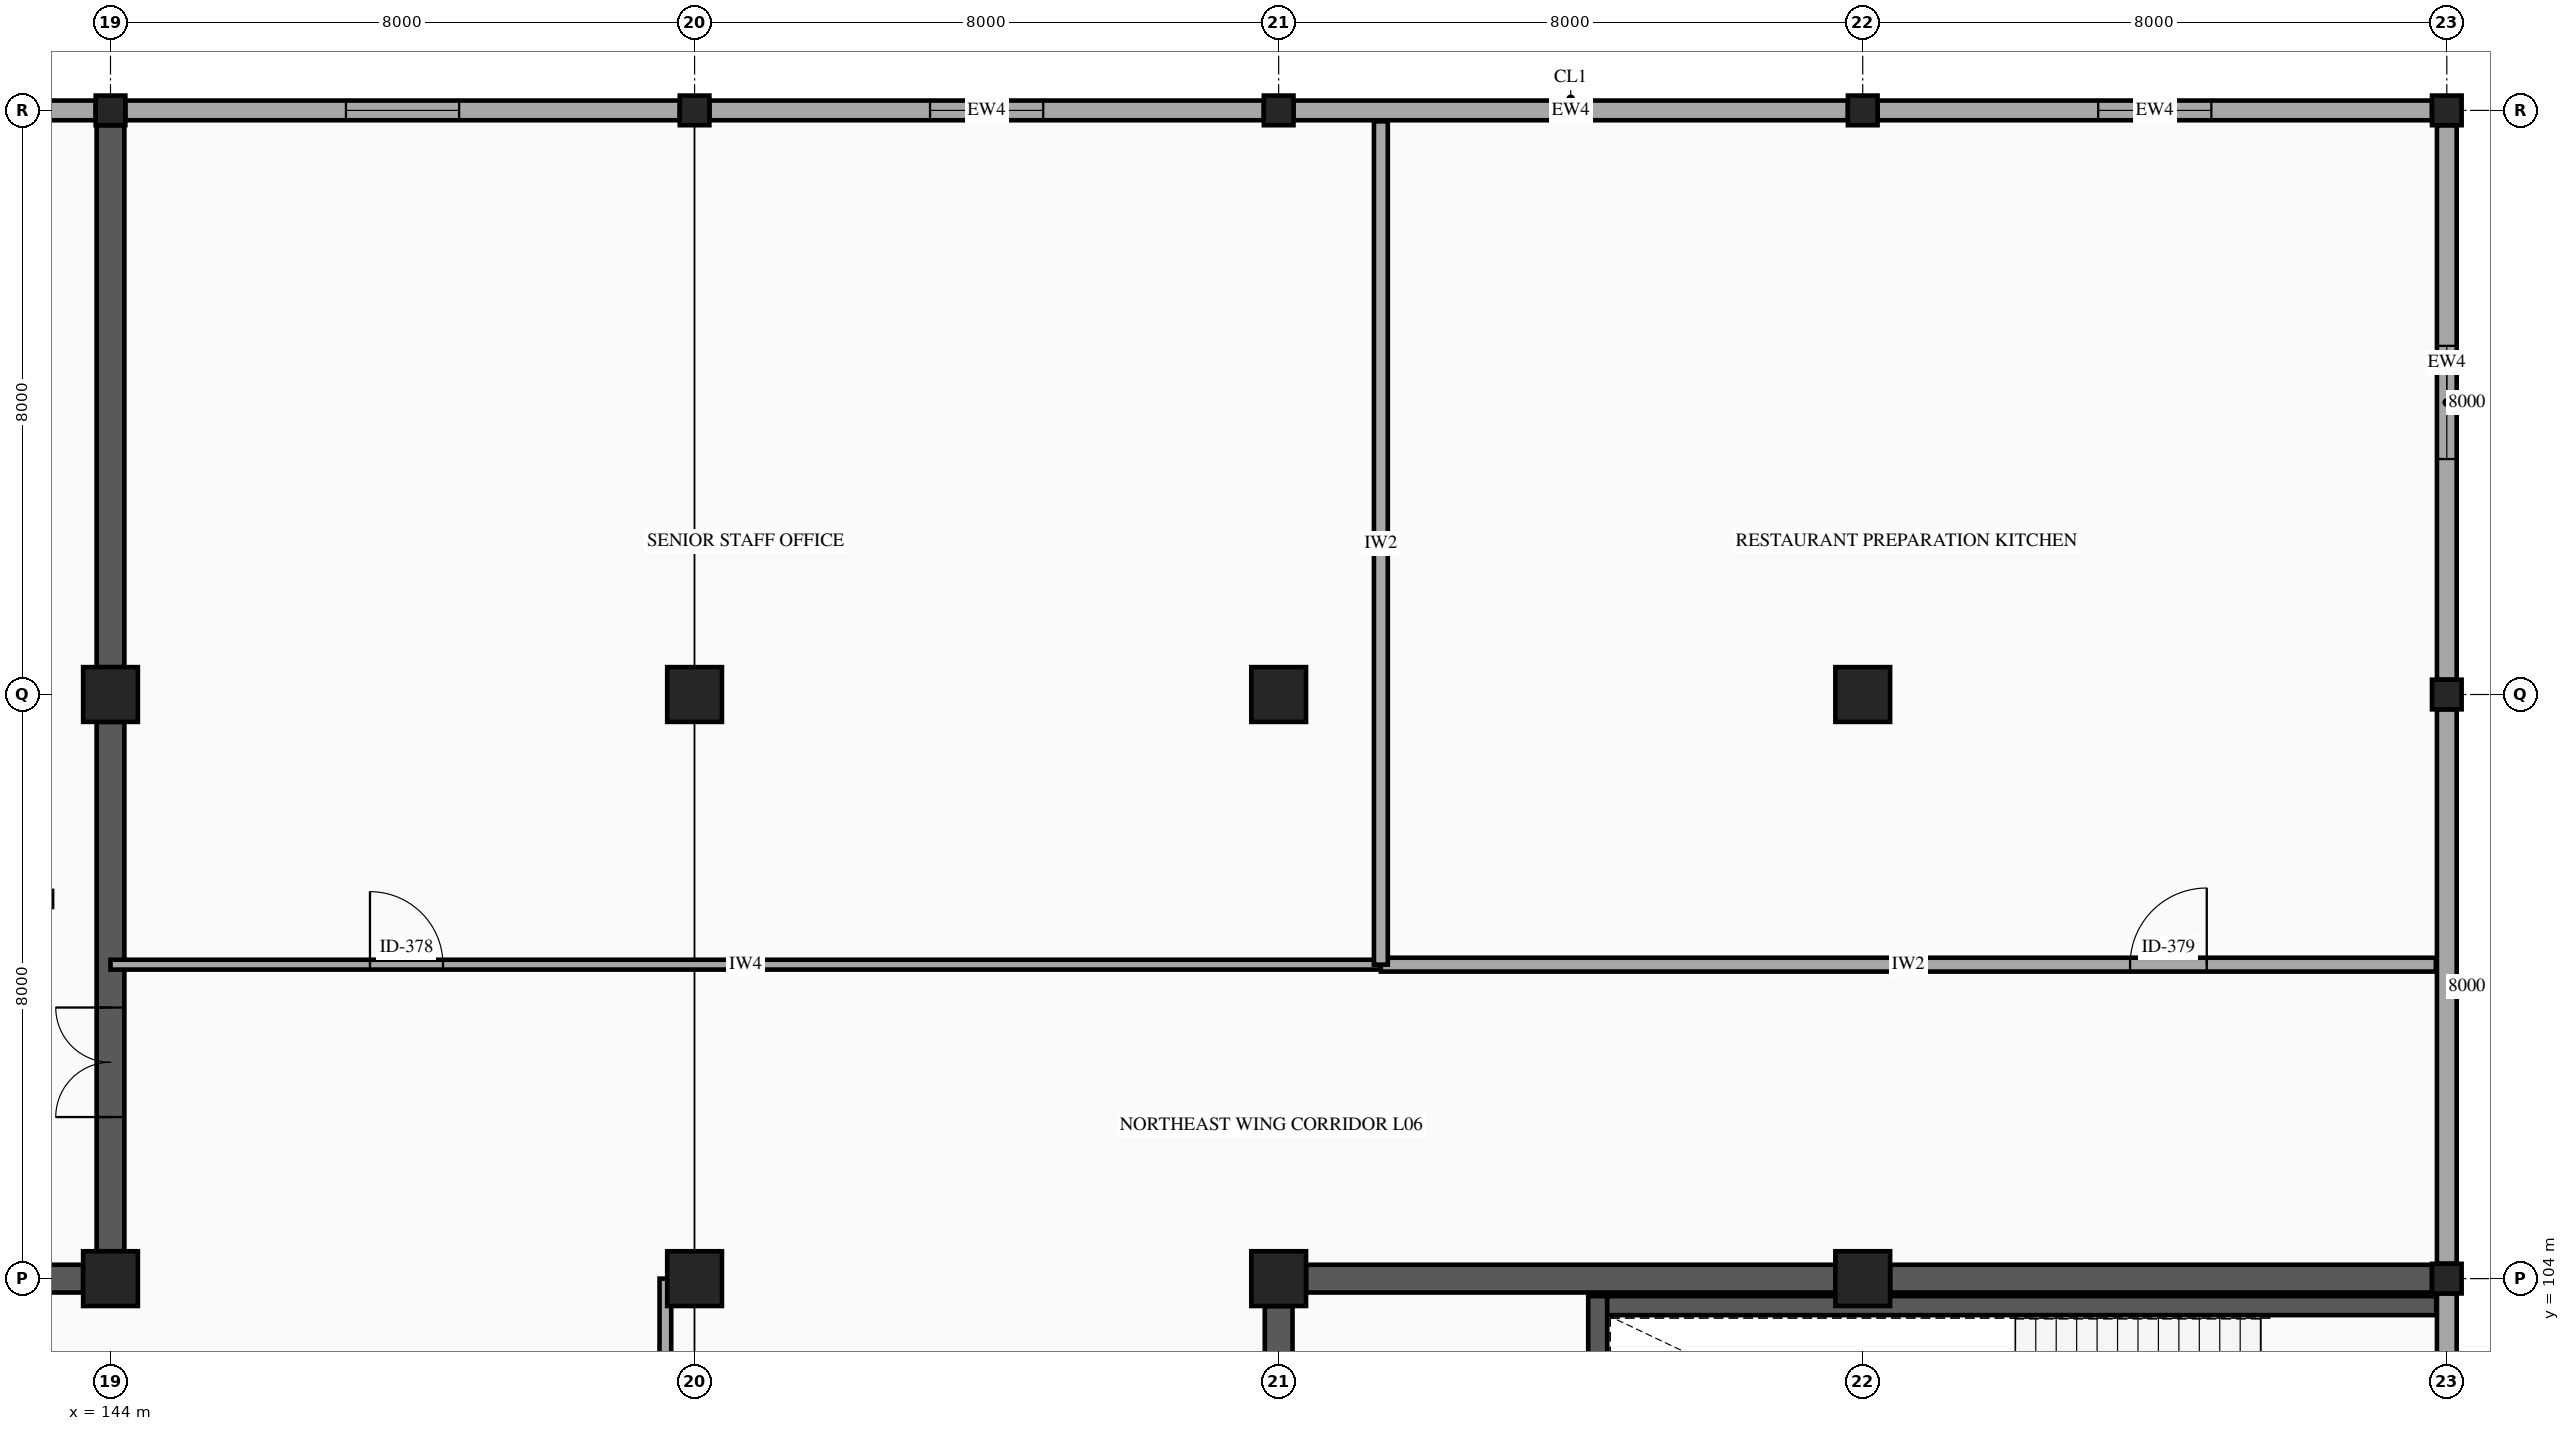
"""IFC4 building model, lengths in metres.
Left out: names, types, materials, properties, quantities, classifications, styles, units other than length and angle.
Written with IfcOpenShell. Run it as: python <this file> out.ifc"""

import sys

from ifc_helpers import new_model, si_unit, direction, frame, frame_2d, origin, origin_2d, place, context, subcontext, project, spatial, rectangle, hollow_rectangle, extrude, element, fill, save


model = new_model("IFC4")
c1 = context("Model", 3, precision=1e-05, world=origin(), true_north=direction((0.0, 1.0)))
c2 = subcontext(c1, "Body", "Model", "MODEL_VIEW")
j1 = project(units=[si_unit("LENGTHUNIT", "METRE"), si_unit("PLANEANGLEUNIT", "RADIAN")], contexts=[c1])
p1 = place(None, origin())
s1 = spatial("IfcSite", under=j1, at=p1, CompositionType="ELEMENT")
p2 = place(p1, origin())
s2 = spatial("IfcBuilding", under=s1, at=p2, CompositionType="ELEMENT")
p3 = place(p2, frame((0.0, 0.0, 28.4)))
s3 = spatial("IfcBuildingStorey", under=s2, at=p3, CompositionType="ELEMENT", Elevation=28.4)
for number, where, z_axis, x_axis in (
    (1, (144.0, 104.0, 0.0), (0.0, 0.0, 1.0), (1.0, 0.0, 0.0)),
    (2, (144.0, 112.0, 0.0), (0.0, 0.0, 1.0), (1.0, 0.0, 0.0)),
):
    element("IfcColumn", number, at=place(p3, frame(where, z_axis=z_axis, x_axis=x_axis)), inside=s3, PredefinedType="COLUMN", context=c2, shape_type="SweptSolid", body=[
        extrude(rectangle(XDim=0.75, YDim=0.75, at=origin_2d()), origin(), (0.0, 0.0, 1.0), 4.5),
    ])
p4 = place(p3, frame((144.0, 120.0, 0.0), z_axis=(0.0, 0.0, 1.0), x_axis=(1.0, 0.0, 0.0)))
e3 = element("IfcColumn", 3, at=p4, inside=s3, PredefinedType="COLUMN", context=c2, shape_type="SweptSolid", body=[
    extrude(hollow_rectangle(XDim=0.406, YDim=0.406, WallThickness=0.015, InnerFilletRadius=0.015, OuterFilletRadius=0.029, at=origin_2d()), origin(), (0.0, 0.0, 1.0), 4.5),
])
for number, where, z_axis, x_axis in (
    (4, (152.0, 104.0, 0.0), (0.0, 0.0, 1.0), (1.0, 0.0, 0.0)),
    (5, (152.0, 112.0, 0.0), (0.0, 0.0, 1.0), (1.0, 0.0, 0.0)),
):
    element("IfcColumn", number, at=place(p3, frame(where, z_axis=z_axis, x_axis=x_axis)), inside=s3, PredefinedType="COLUMN", context=c2, shape_type="SweptSolid", body=[
        extrude(rectangle(XDim=0.75, YDim=0.75, at=origin_2d()), origin(), (0.0, 0.0, 1.0), 4.5),
    ])
p5 = place(p3, frame((152.0, 120.0, 0.0), z_axis=(0.0, 0.0, 1.0), x_axis=(1.0, 0.0, 0.0)))
e6 = element("IfcColumn", 6, at=p5, inside=s3, PredefinedType="COLUMN", context=c2, shape_type="SweptSolid", body=[
    extrude(hollow_rectangle(XDim=0.406, YDim=0.406, WallThickness=0.015, InnerFilletRadius=0.015, OuterFilletRadius=0.029, at=origin_2d()), origin(), (0.0, 0.0, 1.0), 4.5),
])
for number, where, z_axis, x_axis in (
    (7, (160.0, 104.0, 0.0), (0.0, 0.0, 1.0), (1.0, 0.0, 0.0)),
    (8, (160.0, 112.0, 0.0), (0.0, 0.0, 1.0), (1.0, 0.0, 0.0)),
):
    element("IfcColumn", number, at=place(p3, frame(where, z_axis=z_axis, x_axis=x_axis)), inside=s3, PredefinedType="COLUMN", context=c2, shape_type="SweptSolid", body=[
        extrude(rectangle(XDim=0.75, YDim=0.75, at=origin_2d()), origin(), (0.0, 0.0, 1.0), 4.5),
    ])
p6 = place(p3, frame((160.0, 120.0, 0.0), z_axis=(0.0, 0.0, 1.0), x_axis=(1.0, 0.0, 0.0)))
e9 = element("IfcColumn", 9, at=p6, inside=s3, PredefinedType="COLUMN", context=c2, shape_type="SweptSolid", body=[
    extrude(hollow_rectangle(XDim=0.406, YDim=0.406, WallThickness=0.015, InnerFilletRadius=0.015, OuterFilletRadius=0.029, at=origin_2d()), origin(), (0.0, 0.0, 1.0), 4.5),
])
for number, where, z_axis, x_axis in (
    (10, (168.0, 104.0, 0.0), (0.0, 0.0, 1.0), (1.0, 0.0, 0.0)),
    (11, (168.0, 112.0, 0.0), (0.0, 0.0, 1.0), (1.0, 0.0, 0.0)),
):
    element("IfcColumn", number, at=place(p3, frame(where, z_axis=z_axis, x_axis=x_axis)), inside=s3, PredefinedType="COLUMN", context=c2, shape_type="SweptSolid", body=[
        extrude(rectangle(XDim=0.75, YDim=0.75, at=origin_2d()), origin(), (0.0, 0.0, 1.0), 4.5),
    ])
for number, where, z_axis, x_axis in (
    (12, (168.0, 120.0, 0.0), (0.0, 0.0, 1.0), (1.0, 0.0, 0.0)),
    (13, (176.0, 104.0, 0.0), (0.0, 0.0, 1.0), (1.0, 0.0, 0.0)),
    (14, (176.0, 112.0, 0.0), (0.0, 0.0, 1.0), (1.0, 0.0, 0.0)),
    (15, (176.0, 120.0, 0.0), (0.0, 0.0, 1.0), (1.0, 0.0, 0.0)),
):
    element("IfcColumn", number, at=place(p3, frame(where, z_axis=z_axis, x_axis=x_axis)), inside=s3, PredefinedType="COLUMN", context=c2, shape_type="SweptSolid", body=[
        extrude(hollow_rectangle(XDim=0.406, YDim=0.406, WallThickness=0.015, InnerFilletRadius=0.015, OuterFilletRadius=0.029, at=origin_2d()), origin(), (0.0, 0.0, 1.0), 4.5),
    ])
p7 = place(p3, frame((152.203, 120.0, 0.0), z_axis=(0.0, 0.0, 1.0), x_axis=(1.0, 0.0, 0.0)))
e16 = element("IfcWall", 16, at=p7, inside=s3, PredefinedType="STANDARD", context=c2, shape_type="SweptSolid", body=[
    extrude(rectangle(XDim=7.594, YDim=0.27, at=frame_2d((3.797, 0.0))), origin(), (0.0, 0.0, 1.0), 3.48),
])
p8 = place(p7, frame((3.022, 0.0, 0.8)))
e17 = element("IfcOpeningElement", 17, at=p8, cuts=e16, PredefinedType="OPENING", context=c2, shape_type="SweptSolid", body=[
    extrude(rectangle(XDim=1.55, YDim=1.4, at=frame_2d((0.775, 0.7))), frame((0.0, 0.145, 0.0), z_axis=(0.0, -1.0, 0.0), x_axis=(1.0, 0.0, 0.0)), (0.0, 0.0, 1.0), 0.29),
])
p9 = place(p3, frame((160.203, 120.0, 0.0), z_axis=(0.0, 0.0, 1.0), x_axis=(1.0, 0.0, 0.0)))
e18 = element("IfcWall", 18, at=p9, inside=s3, PredefinedType="STANDARD", context=c2, shape_type="SweptSolid", body=[
    extrude(rectangle(XDim=7.594, YDim=0.27, at=frame_2d((3.797, 0.0))), origin(), (0.0, 0.0, 1.0), 3.48),
])
p10 = place(p3, frame((168.203, 120.0, 0.0), z_axis=(0.0, 0.0, 1.0), x_axis=(1.0, 0.0, 0.0)))
e19 = element("IfcWall", 19, at=p10, inside=s3, PredefinedType="STANDARD", context=c2, shape_type="SweptSolid", body=[
    extrude(rectangle(XDim=7.594, YDim=0.27, at=frame_2d((3.797, 0.0))), origin(), (0.0, 0.0, 1.0), 3.48),
])
p11 = place(p10, frame((3.022, 0.0, 0.8)))
e20 = element("IfcOpeningElement", 20, at=p11, cuts=e19, PredefinedType="OPENING", context=c2, shape_type="SweptSolid", body=[
    extrude(rectangle(XDim=1.55, YDim=1.4, at=frame_2d((0.775, 0.7))), frame((0.0, 0.145, 0.0), z_axis=(0.0, -1.0, 0.0), x_axis=(1.0, 0.0, 0.0)), (0.0, 0.0, 1.0), 0.29),
])
p12 = place(p3, frame((176.0, 119.797, 0.0), z_axis=(0.0, 0.0, 1.0), x_axis=(0.0, -1.0, 0.0)))
e21 = element("IfcWall", 21, at=p12, inside=s3, PredefinedType="STANDARD", context=c2, shape_type="SweptSolid", body=[
    extrude(rectangle(XDim=7.594, YDim=0.27, at=frame_2d((3.797, 0.0))), origin(), (0.0, 0.0, 1.0), 3.48),
])
p13 = place(p12, frame((3.022, 0.0, 0.8)))
e22 = element("IfcOpeningElement", 22, at=p13, cuts=e21, PredefinedType="OPENING", context=c2, shape_type="SweptSolid", body=[
    extrude(rectangle(XDim=1.55, YDim=1.4, at=frame_2d((0.775, 0.7))), frame((0.0, 0.145, 0.0), z_axis=(0.0, -1.0, 0.0), x_axis=(1.0, 0.0, 0.0)), (0.0, 0.0, 1.0), 0.29),
])
for number, where, z_axis, x_axis in (
    (23, (176.0, 111.797, 0.0), (0.0, 0.0, 1.0), (0.0, -1.0, 0.0)),
    (24, (176.0, 103.797, 0.0), (0.0, 0.0, 1.0), (0.0, -1.0, 0.0)),
    (25, (136.203, 120.0, 0.0), (0.0, 0.0, 1.0), (1.0, 0.0, 0.0)),
):
    element("IfcWall", number, at=place(p3, frame(where, z_axis=z_axis, x_axis=x_axis)), inside=s3, PredefinedType="STANDARD", context=c2, shape_type="SweptSolid", body=[
        extrude(rectangle(XDim=7.594, YDim=0.27, at=frame_2d((3.797, 0.0))), origin(), (0.0, 0.0, 1.0), 3.48),
    ])
p14 = place(p3, frame((144.203, 120.0, 0.0), z_axis=(0.0, 0.0, 1.0), x_axis=(1.0, 0.0, 0.0)))
e26 = element("IfcWall", 26, at=p14, inside=s3, PredefinedType="STANDARD", context=c2, shape_type="SweptSolid", body=[
    extrude(rectangle(XDim=7.594, YDim=0.27, at=frame_2d((3.797, 0.0))), origin(), (0.0, 0.0, 1.0), 3.48),
])
p15 = place(p14, frame((3.022, 0.0, 0.8)))
e27 = element("IfcOpeningElement", 27, at=p15, cuts=e26, PredefinedType="OPENING", context=c2, shape_type="SweptSolid", body=[
    extrude(rectangle(XDim=1.55, YDim=1.4, at=frame_2d((0.775, 0.7))), frame((0.0, 0.145, 0.0), z_axis=(0.0, -1.0, 0.0), x_axis=(1.0, 0.0, 0.0)), (0.0, 0.0, 1.0), 0.29),
])
p16 = place(p3, frame((136.375, 104.0, 0.0), z_axis=(0.0, 0.0, 1.0), x_axis=(1.0, 0.0, 0.0)))
e28 = element("IfcWall", 28, at=p16, inside=s3, PredefinedType="SHEAR", context=c2, shape_type="SweptSolid", body=[
    extrude(rectangle(XDim=7.25, YDim=0.38, at=frame_2d((3.625, 0.0))), origin(), (0.0, 0.0, 1.0), 4.28),
])
p17 = place(p16, frame((2.875, 0.0, 0.0)))
e29 = element("IfcOpeningElement", 29, at=p17, cuts=e28, PredefinedType="OPENING", context=c2, shape_type="SweptSolid", body=[
    extrude(rectangle(XDim=1.5, YDim=2.15, at=frame_2d((0.75, 1.075))), frame((0.0, 0.2, 0.0), z_axis=(0.0, -1.0, 0.0), x_axis=(1.0, 0.0, 0.0)), (0.0, 0.0, 1.0), 0.4),
])
p18 = place(p3, frame((144.0, 104.375, 0.0), z_axis=(0.0, 0.0, 1.0), x_axis=(0.0, 1.0, 0.0)))
e30 = element("IfcWall", 30, at=p18, inside=s3, PredefinedType="SHEAR", context=c2, shape_type="SweptSolid", body=[
    extrude(rectangle(XDim=7.25, YDim=0.38, at=frame_2d((3.625, 0.0))), origin(), (0.0, 0.0, 1.0), 4.28),
])
p19 = place(p18, frame((1.838, 0.0, 0.0)))
e31 = element("IfcOpeningElement", 31, at=p19, cuts=e30, PredefinedType="OPENING", context=c2, shape_type="SweptSolid", body=[
    extrude(rectangle(XDim=1.5, YDim=2.15, at=frame_2d((0.75, 1.075))), frame((0.0, 0.2, 0.0), z_axis=(0.0, -1.0, 0.0), x_axis=(1.0, 0.0, 0.0)), (0.0, 0.0, 1.0), 0.4),
])
p20 = place(p3, frame((144.0, 112.375, 0.0), z_axis=(0.0, 0.0, 1.0), x_axis=(0.0, 1.0, 0.0)))
e32 = element("IfcWall", 32, at=p20, inside=s3, PredefinedType="SHEAR", context=c2, shape_type="SweptSolid", body=[
    extrude(rectangle(XDim=7.422, YDim=0.38, at=frame_2d((3.711, 0.0))), origin(), (0.0, 0.0, 1.0), 4.28),
])
p21 = place(p3, frame((164.37, 98.99, 0.0), z_axis=(0.0, 0.0, 1.0), x_axis=(0.0, 1.0, 0.0)))
e33 = element("IfcWall", 33, at=p21, inside=s3, PredefinedType="SHEAR", context=c2, shape_type="SweptSolid", body=[
    extrude(rectangle(XDim=4.77, YDim=0.26, at=frame_2d((2.385, 0.0))), origin(), (0.0, 0.0, 1.0), 4.28),
])
p22 = place(p3, frame((164.5, 103.63, 0.0), z_axis=(0.0, 0.0, 1.0), x_axis=(1.0, 0.0, 0.0)))
e34 = element("IfcWall", 34, at=p22, inside=s3, PredefinedType="SHEAR", context=c2, shape_type="SweptSolid", body=[
    extrude(rectangle(XDim=11.355, YDim=0.26, at=frame_2d((5.677, 0.0))), origin(), (0.0, 0.0, 1.0), 4.28),
])
p23 = place(p3, frame((160.375, 104.0, 0.0), z_axis=(0.0, 0.0, 1.0), x_axis=(1.0, 0.0, 0.0)))
e35 = element("IfcWall", 35, at=p23, inside=s3, PredefinedType="SHEAR", context=c2, shape_type="SweptSolid", body=[
    extrude(rectangle(XDim=7.25, YDim=0.38, at=frame_2d((3.625, 0.0))), origin(), (0.0, 0.0, 1.0), 4.28),
])
p24 = place(p3, frame((168.375, 104.0, 0.0), z_axis=(0.0, 0.0, 1.0), x_axis=(1.0, 0.0, 0.0)))
e36 = element("IfcWall", 36, at=p24, inside=s3, PredefinedType="SHEAR", context=c2, shape_type="SweptSolid", body=[
    extrude(rectangle(XDim=7.422, YDim=0.38, at=frame_2d((3.711, 0.0))), origin(), (0.0, 0.0, 1.0), 4.28),
])
p25 = place(p3, frame((160.0, 96.375, 0.0), z_axis=(0.0, 0.0, 1.0), x_axis=(0.0, 1.0, 0.0)))
e37 = element("IfcWall", 37, at=p25, inside=s3, PredefinedType="SHEAR", context=c2, shape_type="SweptSolid", body=[
    extrude(rectangle(XDim=7.25, YDim=0.38, at=frame_2d((3.625, 0.0))), origin(), (0.0, 0.0, 1.0), 4.28),
])
p26 = place(p3, frame((151.6, 88.15, 0.0), z_axis=(0.0, 0.0, 1.0), x_axis=(0.0, 1.0, 0.0)))
e38 = element("IfcWall", 38, at=p26, inside=s3, PredefinedType="PARTITIONING", context=c2, shape_type="SweptSolid", body=[
    extrude(rectangle(XDim=15.85, YDim=0.16, at=frame_2d((7.925, 0.0))), origin(), (0.0, 0.0, 1.0), 3.48),
])
p27 = place(p26, frame((11.356, 0.0, 0.0)))
e39 = element("IfcOpeningElement", 39, at=p27, cuts=e38, PredefinedType="OPENING", context=c2, shape_type="SweptSolid", body=[
    extrude(rectangle(XDim=1.0, YDim=2.15, at=frame_2d((0.5, 1.075))), frame((0.0, 0.09, 0.0), z_axis=(0.0, -1.0, 0.0), x_axis=(1.0, 0.0, 0.0)), (0.0, 0.0, 1.0), 0.18),
])
p28 = place(p3, frame((144.0, 108.3, 0.0), z_axis=(0.0, 0.0, 1.0), x_axis=(1.0, 0.0, 0.0)))
e40 = element("IfcWall", 40, at=p28, inside=s3, PredefinedType="PARTITIONING", context=c2, shape_type="SweptSolid", body=[
    extrude(rectangle(XDim=17.4, YDim=0.135, at=frame_2d((8.7, 0.0))), origin(), (0.0, 0.0, 1.0), 3.48),
])
p29 = place(p28, frame((3.554, 0.0, 0.0)))
e41 = element("IfcOpeningElement", 41, at=p29, cuts=e40, PredefinedType="OPENING", context=c2, shape_type="SweptSolid", body=[
    extrude(rectangle(XDim=1.0, YDim=2.15, at=frame_2d((0.5, 1.075))), frame((0.0, 0.077, 0.0), z_axis=(0.0, -1.0, 0.0), x_axis=(1.0, 0.0, 0.0)), (0.0, 0.0, 1.0), 0.155),
])
p30 = place(p3, frame((161.4, 108.3, 0.0), z_axis=(0.0, 0.0, 1.0), x_axis=(1.0, 0.0, 0.0)))
e42 = element("IfcWall", 42, at=p30, inside=s3, PredefinedType="PARTITIONING", context=c2, shape_type="SweptSolid", body=[
    extrude(rectangle(XDim=14.45, YDim=0.19, at=frame_2d((7.225, 0.0))), origin(), (0.0, 0.0, 1.0), 3.48),
])
p31 = place(p30, frame((10.262, 0.0, 0.0)))
e43 = element("IfcOpeningElement", 43, at=p31, cuts=e42, PredefinedType="OPENING", context=c2, shape_type="SweptSolid", body=[
    extrude(rectangle(XDim=1.05, YDim=2.15, at=frame_2d((0.525, 1.075))), frame((0.0, 0.105, 0.0), z_axis=(0.0, -1.0, 0.0), x_axis=(1.0, 0.0, 0.0)), (0.0, 0.0, 1.0), 0.21),
])
p32 = place(p3, frame((161.4, 108.3, 0.0), z_axis=(0.0, 0.0, 1.0), x_axis=(0.0, 1.0, 0.0)))
e44 = element("IfcWall", 44, at=p32, inside=s3, PredefinedType="PARTITIONING", context=c2, shape_type="SweptSolid", body=[
    extrude(rectangle(XDim=11.55, YDim=0.19, at=frame_2d((5.775, 0.0))), origin(), (0.0, 0.0, 1.0), 3.48),
])
p33 = place(p8, origin())
e45 = element("IfcWindow", 45, at=p33, inside=s3, PartitioningType="SINGLE_PANEL", PredefinedType="WINDOW", context=c2, shape_type="SweptSolid", body=[
    extrude(rectangle(XDim=1.55, YDim=1.4, at=frame_2d((0.775, 0.7))), frame((0.0, 0.03, 0.0), z_axis=(0.0, -1.0, 0.0), x_axis=(1.0, 0.0, 0.0)), (0.0, 0.0, 1.0), 0.06),
])
fill(e17, e45)
p34 = place(p11, origin())
e46 = element("IfcWindow", 46, at=p34, inside=s3, PartitioningType="SINGLE_PANEL", PredefinedType="WINDOW", context=c2, shape_type="SweptSolid", body=[
    extrude(rectangle(XDim=1.55, YDim=1.4, at=frame_2d((0.775, 0.7))), frame((0.0, 0.03, 0.0), z_axis=(0.0, -1.0, 0.0), x_axis=(1.0, 0.0, 0.0)), (0.0, 0.0, 1.0), 0.06),
])
fill(e20, e46)
p35 = place(p13, origin())
e47 = element("IfcWindow", 47, at=p35, inside=s3, PartitioningType="SINGLE_PANEL", PredefinedType="WINDOW", context=c2, shape_type="SweptSolid", body=[
    extrude(rectangle(XDim=1.55, YDim=1.4, at=frame_2d((0.775, 0.7))), frame((0.0, 0.03, 0.0), z_axis=(0.0, -1.0, 0.0), x_axis=(1.0, 0.0, 0.0)), (0.0, 0.0, 1.0), 0.06),
])
fill(e22, e47)
p36 = place(p15, origin())
e48 = element("IfcWindow", 48, at=p36, inside=s3, PartitioningType="SINGLE_PANEL", PredefinedType="WINDOW", context=c2, shape_type="SweptSolid", body=[
    extrude(rectangle(XDim=1.55, YDim=1.4, at=frame_2d((0.775, 0.7))), frame((0.0, 0.03, 0.0), z_axis=(0.0, -1.0, 0.0), x_axis=(1.0, 0.0, 0.0)), (0.0, 0.0, 1.0), 0.06),
])
fill(e27, e48)
p37 = place(p19, origin())
e49 = element("IfcDoor", 49, at=p37, inside=s3, OperationType="DOUBLE_DOOR_SINGLE_SWING", PredefinedType="DOOR", context=c2, shape_type="SweptSolid", body=[
    extrude(rectangle(XDim=1.5, YDim=2.15, at=frame_2d((0.75, 1.075))), frame((0.0, 0.025, 0.0), z_axis=(0.0, -1.0, 0.0), x_axis=(1.0, 0.0, 0.0)), (0.0, 0.0, 1.0), 0.05),
])
fill(e31, e49)
p38 = place(p29, origin())
e50 = element("IfcDoor", 50, at=p38, inside=s3, OperationType="SINGLE_SWING_LEFT", PredefinedType="DOOR", context=c2, shape_type="SweptSolid", body=[
    extrude(rectangle(XDim=1.0, YDim=2.15, at=frame_2d((0.5, 1.075))), frame((0.0, 0.025, 0.0), z_axis=(0.0, -1.0, 0.0), x_axis=(1.0, 0.0, 0.0)), (0.0, 0.0, 1.0), 0.05),
])
fill(e41, e50)
p39 = place(p31, origin())
e51 = element("IfcDoor", 51, at=p39, inside=s3, OperationType="SINGLE_SWING_RIGHT", PredefinedType="DOOR", context=c2, shape_type="SweptSolid", body=[
    extrude(rectangle(XDim=1.05, YDim=2.15, at=frame_2d((0.525, 1.075))), frame((0.0, 0.025, 0.0), z_axis=(0.0, -1.0, 0.0), x_axis=(1.0, 0.0, 0.0)), (0.0, 0.0, 1.0), 0.05),
])
fill(e43, e51)
save(model, sys.argv[1])
